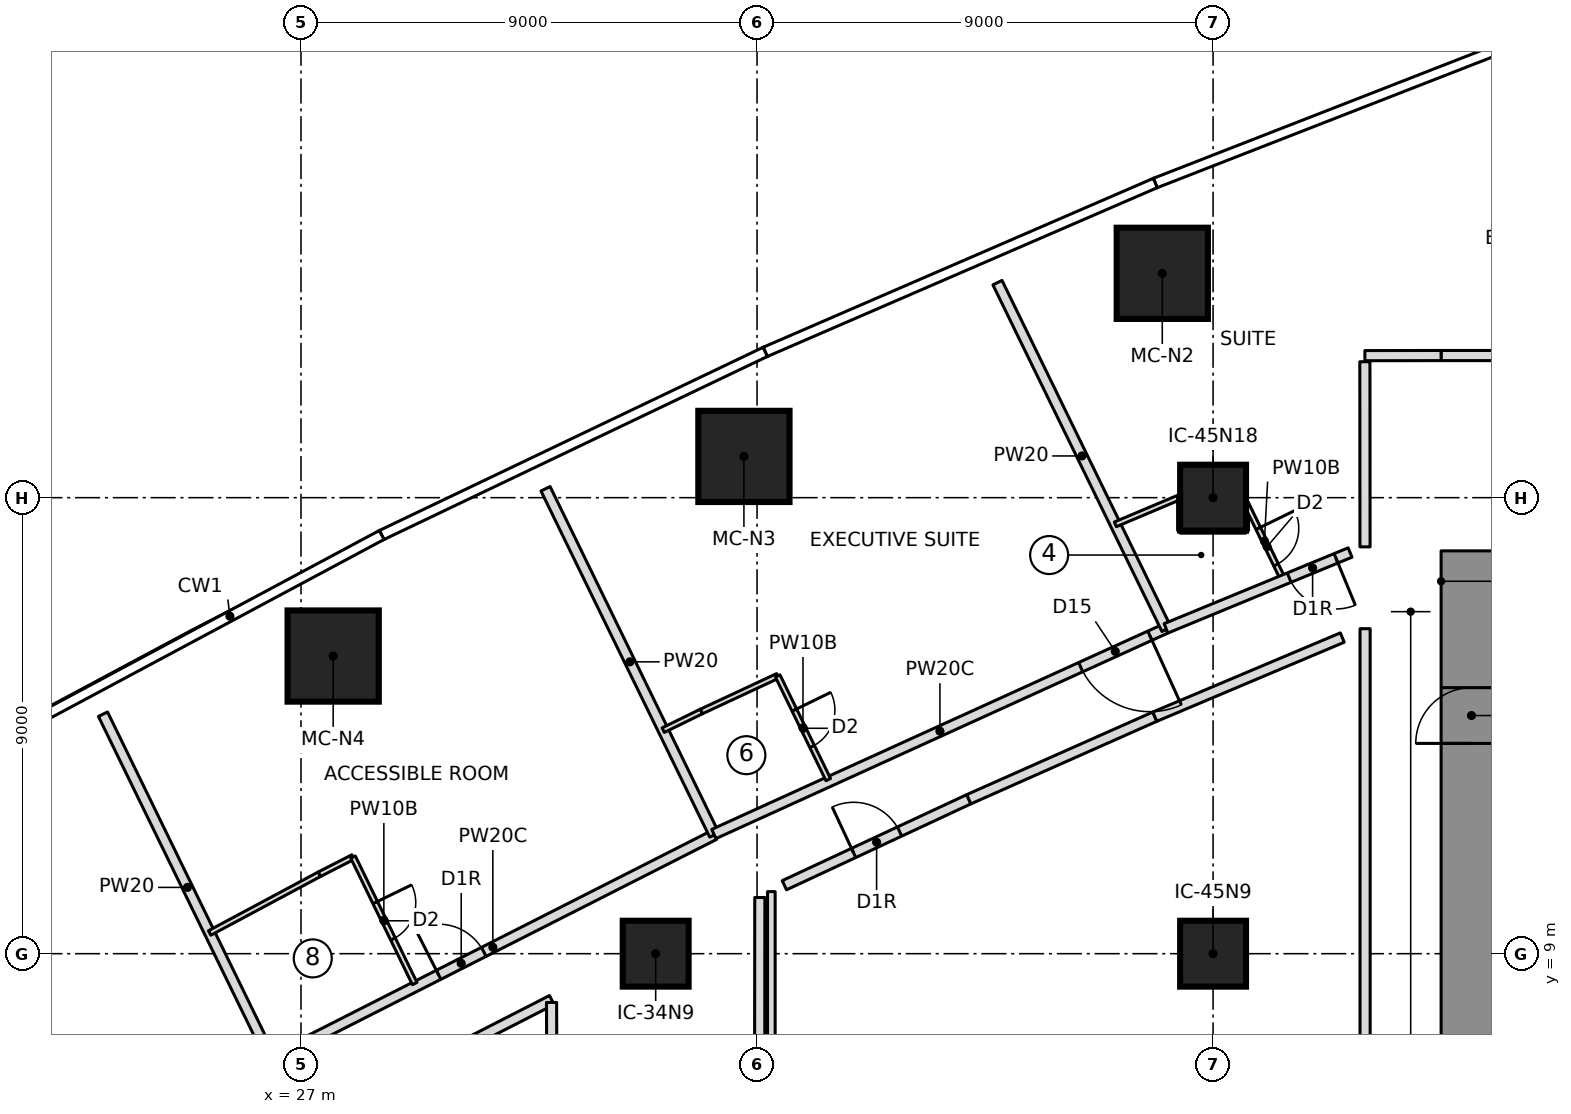
"""IFC4 building model, lengths in metres.
Left out: names, types, materials, properties, quantities, classifications, styles, units other than length and angle.
Written with IfcOpenShell. Run it as: python <this file> out.ifc"""

import sys

from ifc_helpers import new_model, si_unit, direction, frame, frame_2d, origin, origin_2d, place, context, subcontext, project, spatial, rectangle, extrude, element, fill, save


model = new_model("IFC4")
c1 = context("Model", 3, precision=1e-05, world=origin(), true_north=direction((0.0, 1.0)))
c2 = subcontext(c1, "Body", "Model", "MODEL_VIEW")
j1 = project(units=[si_unit("LENGTHUNIT", "METRE"), si_unit("PLANEANGLEUNIT", "RADIAN")], contexts=[c1])
p1 = place(None, origin())
s1 = spatial("IfcSite", under=j1, at=p1, CompositionType="ELEMENT")
p2 = place(p1, origin())
s2 = spatial("IfcBuilding", under=s1, at=p2, CompositionType="ELEMENT")
p3 = place(p2, frame((0.0, 0.0, 60.9)))
s3 = spatial("IfcBuildingStorey", under=s2, at=p3, CompositionType="ELEMENT", Elevation=60.9)
p4 = place(p3, frame((50.1, 6.65, 0.0), z_axis=(0.0, 0.0, 1.0), x_axis=(0.0, 1.0, 0.0)))
e1 = element("IfcWall", 1, at=p4, inside=s3, PredefinedType="SHEAR", context=c2, shape_type="SweptSolid", body=[
    extrude(rectangle(XDim=10.3, YDim=1.2, at=frame_2d((5.15, 0.0))), origin(), (0.0, 0.0, 1.0), 3.55),
])
p5 = place(p4, frame((6.5, 0.0, 0.0)))
e2 = element("IfcOpeningElement", 2, at=p5, cuts=e1, PredefinedType="OPENING", context=c2, shape_type="SweptSolid", body=[
    extrude(rectangle(XDim=1.1, YDim=2.1, at=frame_2d((0.55, 1.05))), frame((0.0, 0.61, 0.0), z_axis=(0.0, -1.0, 0.0), x_axis=(1.0, 0.0, 0.0)), (0.0, 0.0, 1.0), 1.22),
])
for number, where, z_axis, x_axis in (
    (3, (43.998, 22.428, 0.0), (0.0, 0.0, 1.0), (1.0, 0.0, 0.0)),
    (4, (35.741, 18.814, 0.0), (0.0, 0.0, 1.0), (1.0, 0.0, 0.0)),
    (5, (27.635, 14.874, 0.0), (0.0, 0.0, 1.0), (1.0, 0.0, 0.0)),
):
    element("IfcColumn", number, at=place(p3, frame(where, z_axis=z_axis, x_axis=x_axis)), inside=s3, PredefinedType="COLUMN", context=c2, shape_type="SweptSolid", body=[
        extrude(rectangle(XDim=1.8, YDim=1.8, at=origin_2d()), origin(), (0.0, 0.0, 1.0), 3.55),
    ])
for number, where, z_axis, x_axis in (
    (6, (34.0, 9.0, 0.0), (0.0, 0.0, 1.0), (1.0, 0.0, 0.0)),
    (7, (45.0, 9.0, 0.0), (0.0, 0.0, 1.0), (1.0, 0.0, 0.0)),
    (8, (45.0, 18.0, 0.0), (0.0, 0.0, 1.0), (1.0, 0.0, 0.0)),
):
    element("IfcColumn", number, at=place(p3, frame(where, z_axis=z_axis, x_axis=x_axis)), inside=s3, PredefinedType="COLUMN", context=c2, shape_type="SweptSolid", body=[
        extrude(rectangle(XDim=1.3, YDim=1.3, at=origin_2d()), origin(), (0.0, 0.0, 1.0), 3.55),
    ])
p6 = place(p3, frame((26.425, 6.89, 0.0), z_axis=(0.0, 0.0, 1.0), x_axis=(-0.438202895602, 0.898876088394, 0.0)))
e9 = element("IfcWall", 9, at=p6, inside=s3, PredefinedType="PARTITIONING", context=c2, shape_type="SweptSolid", body=[
    extrude(rectangle(XDim=7.605, YDim=0.2, at=frame_2d((3.803, 0.0))), origin(), (0.0, 0.0, 1.0), 3.25),
])
p7 = place(p3, frame((26.417, 6.908, 0.0), z_axis=(0.0, 0.0, 1.0), x_axis=(0.891700643128, 0.452625632334, 0.0)))
e10 = element("IfcWall", 10, at=p7, inside=s3, PredefinedType="PARTITIONING", context=c2, shape_type="SweptSolid", body=[
    extrude(rectangle(XDim=9.801, YDim=0.2, at=frame_2d((4.901, 0.0))), origin(), (0.0, 0.0, 1.0), 3.25),
])
p8 = place(p7, frame((3.7, 0.0, 0.0)))
e11 = element("IfcOpeningElement", 11, at=p8, cuts=e10, PredefinedType="OPENING", context=c2, shape_type="SweptSolid", body=[
    extrude(rectangle(XDim=1.0, YDim=2.1, at=frame_2d((0.5, 1.05))), frame((0.0, 0.11, 0.0), z_axis=(0.0, -1.0, 0.0), x_axis=(1.0, 0.0, 0.0)), (0.0, 0.0, 1.0), 0.22),
])
p9 = place(p3, frame((25.198, 9.409, 0.0), z_axis=(0.0, 0.0, 1.0), x_axis=(0.881658684569, 0.471887660279, 0.0)))
e12 = element("IfcWall", 12, at=p9, inside=s3, PredefinedType="PARTITIONING", context=c2, shape_type="SweptSolid", body=[
    extrude(rectangle(XDim=2.457, YDim=0.1, at=frame_2d((1.228, 0.0))), origin(), (0.0, 0.0, 1.0), 3.25),
])
p10 = place(p3, frame((27.363, 10.568, 0.0), z_axis=(0.0, 0.0, 1.0), x_axis=(0.890195653003, 0.455578422858, 0.0)))
e13 = element("IfcWall", 13, at=p10, inside=s3, PredefinedType="PARTITIONING", context=c2, shape_type="SweptSolid", body=[
    extrude(rectangle(XDim=0.745, YDim=0.1, at=frame_2d((0.373, 0.0))), origin(), (0.0, 0.0, 1.0), 3.25),
])
p11 = place(p3, frame((28.027, 10.907, 0.0), z_axis=(0.0, 0.0, 1.0), x_axis=(0.438189818179, -0.898882463531, 0.0)))
e14 = element("IfcWall", 14, at=p11, inside=s3, PredefinedType="PARTITIONING", context=c2, shape_type="SweptSolid", body=[
    extrude(rectangle(XDim=2.777, YDim=0.1, at=frame_2d((1.389, 0.0))), origin(), (0.0, 0.0, 1.0), 3.25),
])
p12 = place(p11, frame((1.0, 0.0, 0.0)))
e15 = element("IfcOpeningElement", 15, at=p12, cuts=e14, PredefinedType="OPENING", context=c2, shape_type="SweptSolid", body=[
    extrude(rectangle(XDim=0.8, YDim=2.1, at=frame_2d((0.4, 1.05))), frame((0.0, 0.06, 0.0), z_axis=(0.0, -1.0, 0.0), x_axis=(1.0, 0.0, 0.0)), (0.0, 0.0, 1.0), 0.12),
])
p13 = place(p3, frame((35.156, 11.344, 0.0), z_axis=(0.0, 0.0, 1.0), x_axis=(-0.438196407286, 0.898879251425, 0.0)))
e16 = element("IfcWall", 16, at=p13, inside=s3, PredefinedType="PARTITIONING", context=c2, shape_type="SweptSolid", body=[
    extrude(rectangle(XDim=7.6, YDim=0.2, at=frame_2d((3.8, 0.0))), origin(), (0.0, 0.0, 1.0), 3.25),
])
p14 = place(p3, frame((44.072, 15.421, 0.0), z_axis=(0.0, 0.0, 1.0), x_axis=(-0.910287143541, -0.413977434534, 0.0)))
e17 = element("IfcWall", 17, at=p14, inside=s3, PredefinedType="PARTITIONING", context=c2, shape_type="SweptSolid", body=[
    extrude(rectangle(XDim=9.803, YDim=0.2, at=frame_2d((4.902, 0.0))), origin(), (0.0, 0.0, 1.0), 3.25),
])
p15 = place(p14, frame((0.35, 0.0, 0.0)))
e18 = element("IfcOpeningElement", 18, at=p15, cuts=e17, PredefinedType="OPENING", context=c2, shape_type="SweptSolid", body=[
    extrude(rectangle(XDim=1.5, YDim=2.1, at=frame_2d((0.75, 1.05))), frame((0.0, 0.11, 0.0), z_axis=(0.0, -1.0, 0.0), x_axis=(1.0, 0.0, 0.0)), (0.0, 0.0, 1.0), 0.22),
])
p16 = place(p3, frame((34.148, 13.412, 0.0), z_axis=(0.0, 0.0, 1.0), x_axis=(0.89828999443, 0.43940310184, 0.0)))
e19 = element("IfcWall", 19, at=p16, inside=s3, PredefinedType="PARTITIONING", context=c2, shape_type="SweptSolid", body=[
    extrude(rectangle(XDim=0.84, YDim=0.1, at=frame_2d((0.42, 0.0))), origin(), (0.0, 0.0, 1.0), 3.25),
])
p17 = place(p3, frame((34.903, 13.781, 0.0), z_axis=(0.0, 0.0, 1.0), x_axis=(0.906434605418, 0.422346192242, 0.0)))
e20 = element("IfcWall", 20, at=p17, inside=s3, PredefinedType="PARTITIONING", context=c2, shape_type="SweptSolid", body=[
    extrude(rectangle(XDim=1.661, YDim=0.1, at=frame_2d((0.83, 0.0))), origin(), (0.0, 0.0, 1.0), 3.25),
])
p18 = place(p3, frame((36.408, 14.482, 0.0), z_axis=(0.0, 0.0, 1.0), x_axis=(0.438271544149, -0.898842618921, 0.0)))
e21 = element("IfcWall", 21, at=p18, inside=s3, PredefinedType="PARTITIONING", context=c2, shape_type="SweptSolid", body=[
    extrude(rectangle(XDim=2.277, YDim=0.1, at=frame_2d((1.139, 0.0))), origin(), (0.0, 0.0, 1.0), 3.25),
])
p19 = place(p18, frame((0.75, 0.0, 0.0)))
e22 = element("IfcOpeningElement", 22, at=p19, cuts=e21, PredefinedType="OPENING", context=c2, shape_type="SweptSolid", body=[
    extrude(rectangle(XDim=0.8, YDim=2.1, at=frame_2d((0.4, 1.05))), frame((0.0, 0.06, 0.0), z_axis=(0.0, -1.0, 0.0), x_axis=(1.0, 0.0, 0.0)), (0.0, 0.0, 1.0), 0.12),
])
p20 = place(p3, frame((44.08, 15.403, 0.0), z_axis=(0.0, 0.0, 1.0), x_axis=(-0.438196739796, 0.898879089328, 0.0)))
e23 = element("IfcWall", 23, at=p20, inside=s3, PredefinedType="PARTITIONING", context=c2, shape_type="SweptSolid", body=[
    extrude(rectangle(XDim=7.611, YDim=0.2, at=frame_2d((3.806, 0.0))), origin(), (0.0, 0.0, 1.0), 3.25),
])
p21 = place(p3, frame((43.071, 17.473, 0.0), z_axis=(0.0, 0.0, 1.0), x_axis=(0.921313965742, 0.388819465214, 0.0)))
e24 = element("IfcWall", 24, at=p21, inside=s3, PredefinedType="PARTITIONING", context=c2, shape_type="SweptSolid", body=[
    extrude(rectangle(XDim=1.388, YDim=0.1, at=frame_2d((0.694, 0.0))), origin(), (0.0, 0.0, 1.0), 3.25),
])
p22 = place(p3, frame((44.35, 18.013, 0.0), z_axis=(0.0, 0.0, 1.0), x_axis=(0.0, -1.0, 0.0)))
e25 = element("IfcWall", 25, at=p22, inside=s3, PredefinedType="PARTITIONING", context=c2, shape_type="SweptSolid", body=[
    extrude(rectangle(XDim=0.661, YDim=0.1, at=frame_2d((0.331, 0.0))), origin(), (0.0, 0.0, 1.0), 3.25),
])
p23 = place(p3, frame((44.352, 17.35, 0.0), z_axis=(0.0, 0.0, 1.0), x_axis=(1.0, 0.0, 0.0)))
e26 = element("IfcWall", 26, at=p23, inside=s3, PredefinedType="PARTITIONING", context=c2, shape_type="SweptSolid", body=[
    extrude(rectangle(XDim=1.296, YDim=0.1, at=frame_2d((0.648, 0.0))), origin(), (0.0, 0.0, 1.0), 3.25),
])
p24 = place(p3, frame((45.65, 17.352, 0.0), z_axis=(0.0, 0.0, 1.0), x_axis=(0.0, 1.0, 0.0)))
e27 = element("IfcWall", 27, at=p24, inside=s3, PredefinedType="PARTITIONING", context=c2, shape_type="SweptSolid", body=[
    extrude(rectangle(XDim=0.536, YDim=0.1, at=frame_2d((0.268, 0.0))), origin(), (0.0, 0.0, 1.0), 3.25),
])
p25 = place(p3, frame((45.65, 17.888, 0.0), z_axis=(0.0, 0.0, 1.0), x_axis=(0.438301838547, -0.89882784688, 0.0)))
e28 = element("IfcWall", 28, at=p25, inside=s3, PredefinedType="PARTITIONING", context=c2, shape_type="SweptSolid", body=[
    extrude(rectangle(XDim=1.659, YDim=0.1, at=frame_2d((0.829, 0.0))), origin(), (0.0, 0.0, 1.0), 3.25),
])
p26 = place(p25, frame((0.55, 0.0, 0.0)))
e29 = element("IfcOpeningElement", 29, at=p26, cuts=e28, PredefinedType="OPENING", context=c2, shape_type="SweptSolid", body=[
    extrude(rectangle(XDim=0.8, YDim=2.1, at=frame_2d((0.4, 1.05))), frame((0.0, 0.06, 0.0), z_axis=(0.0, -1.0, 0.0), x_axis=(1.0, 0.0, 0.0)), (0.0, 0.0, 1.0), 0.12),
])
p27 = place(p3, frame((29.357, 6.758, 0.0), z_axis=(0.0, 0.0, 1.0), x_axis=(0.890213377055, 0.455543788579, 0.0)))
e30 = element("IfcWall", 30, at=p27, inside=s3, PredefinedType="PARTITIONING", context=c2, shape_type="SweptSolid", body=[
    extrude(rectangle(XDim=2.912, YDim=0.2, at=frame_2d((1.456, 0.0))), origin(), (0.0, 0.0, 1.0), 3.25),
])
p28 = place(p3, frame((36.283, -10.225, 0.0), z_axis=(0.0, 0.0, 1.0), x_axis=(0.0, 1.0, 0.0)))
e31 = element("IfcWall", 31, at=p28, inside=s3, PredefinedType="PARTITIONING", context=c2, shape_type="SweptSolid", body=[
    extrude(rectangle(XDim=20.45, YDim=0.15, at=frame_2d((10.225, 0.0))), origin(), (0.0, 0.0, 1.0), 3.25),
])
p29 = place(p3, frame((36.54, 10.351, 0.0), z_axis=(0.0, 0.0, 1.0), x_axis=(0.906347708834, 0.42253263861, 0.0)))
e32 = element("IfcWall", 32, at=p29, inside=s3, PredefinedType="PARTITIONING", context=c2, shape_type="SweptSolid", body=[
    extrude(rectangle(XDim=4.016, YDim=0.2, at=frame_2d((2.008, 0.0))), origin(), (0.0, 0.0, 1.0), 3.25),
])
p30 = place(p29, frame((1.508, 0.0, 0.0)))
e33 = element("IfcOpeningElement", 33, at=p30, cuts=e32, PredefinedType="OPENING", context=c2, shape_type="SweptSolid", body=[
    extrude(rectangle(XDim=1.0, YDim=2.1, at=frame_2d((0.5, 1.05))), frame((0.0, 0.11, 0.0), z_axis=(0.0, -1.0, 0.0), x_axis=(1.0, 0.0, 0.0)), (0.0, 0.0, 1.0), 0.22),
])
p31 = place(p3, frame((40.18, 12.048, 0.0), z_axis=(0.0, 0.0, 1.0), x_axis=(0.913986953061, 0.405743576209, 0.0)))
e34 = element("IfcWall", 34, at=p31, inside=s3, PredefinedType="PARTITIONING", context=c2, shape_type="SweptSolid", body=[
    extrude(rectangle(XDim=4.016, YDim=0.2, at=frame_2d((2.008, 0.0))), origin(), (0.0, 0.0, 1.0), 3.25),
])
p32 = place(p3, frame((43.85, 13.677, 0.0), z_axis=(0.0, 0.0, 1.0), x_axis=(0.921269894054, 0.388923877269, 0.0)))
e35 = element("IfcWall", 35, at=p32, inside=s3, PredefinedType="PARTITIONING", context=c2, shape_type="SweptSolid", body=[
    extrude(rectangle(XDim=4.016, YDim=0.2, at=frame_2d((2.008, 0.0))), origin(), (0.0, 0.0, 1.0), 3.25),
])
p33 = place(p3, frame((54.597, 20.805, 0.0), z_axis=(0.0, 0.0, 1.0), x_axis=(-1.0, 0.0, 0.0)))
e36 = element("IfcWall", 36, at=p33, inside=s3, PredefinedType="PARTITIONING", context=c2, shape_type="SweptSolid", body=[
    extrude(rectangle(XDim=5.097, YDim=0.2, at=frame_2d((2.548, 0.0))), origin(), (0.0, 0.0, 1.0), 3.25),
])
p34 = place(p33, frame((2.048, 0.0, 0.0)))
e37 = element("IfcOpeningElement", 37, at=p34, cuts=e36, PredefinedType="OPENING", context=c2, shape_type="SweptSolid", body=[
    extrude(rectangle(XDim=1.5, YDim=2.1, at=frame_2d((0.75, 1.05))), frame((0.0, 0.11, 0.0), z_axis=(0.0, -1.0, 0.0), x_axis=(1.0, 0.0, 0.0)), (0.0, 0.0, 1.0), 0.22),
])
p35 = place(p3, frame((47.704, 16.917, 0.0), z_axis=(0.0, 0.0, 1.0), x_axis=(-0.924573816857, -0.381002962169, 0.0)))
e38 = element("IfcWall", 38, at=p35, inside=s3, PredefinedType="PARTITIONING", context=c2, shape_type="SweptSolid", body=[
    extrude(rectangle(XDim=3.929, YDim=0.2, at=frame_2d((1.964, 0.0))), origin(), (0.0, 0.0, 1.0), 3.25),
])
p36 = place(p35, frame((0.3, 0.0, 0.0)))
e39 = element("IfcOpeningElement", 39, at=p36, cuts=e38, PredefinedType="OPENING", context=c2, shape_type="SweptSolid", body=[
    extrude(rectangle(XDim=1.0, YDim=2.1, at=frame_2d((0.5, 1.05))), frame((0.0, 0.11, 0.0), z_axis=(0.0, -1.0, 0.0), x_axis=(1.0, 0.0, 0.0)), (0.0, 0.0, 1.0), 0.22),
])
p37 = place(p3, frame((31.945, 8.037, 0.0), z_axis=(0.0, 0.0, 1.0), x_axis=(0.003129875123, -0.999995101929, 0.0)))
e40 = element("IfcWall", 40, at=p37, inside=s3, PredefinedType="PARTITIONING", context=c2, shape_type="SweptSolid", body=[
    extrude(rectangle(XDim=1.092, YDim=0.2, at=frame_2d((0.546, 0.0))), origin(), (0.0, 0.0, 1.0), 3.25),
])
p38 = place(p3, frame((36.052, 6.986, 0.0), z_axis=(0.0, 0.0, 1.0), x_axis=(0.000781799464, 0.999999694395, 0.0)))
e41 = element("IfcWall", 41, at=p38, inside=s3, PredefinedType="PARTITIONING", context=c2, shape_type="SweptSolid", body=[
    extrude(rectangle(XDim=3.123, YDim=0.2, at=frame_2d((1.562, 0.0))), origin(), (0.0, 0.0, 1.0), 3.25),
])
p39 = place(p3, frame((48.0, 15.414, 0.0), z_axis=(0.0, 0.0, 1.0), x_axis=(0.0, -1.0, 0.0)))
e42 = element("IfcWall", 42, at=p39, inside=s3, PredefinedType="PARTITIONING", context=c2, shape_type="SweptSolid", body=[
    extrude(rectangle(XDim=30.828, YDim=0.2, at=frame_2d((15.414, 0.0))), origin(), (0.0, 0.0, 1.0), 3.25),
])
p40 = place(p3, frame((49.5, 20.805, 0.0), z_axis=(0.0, 0.0, 1.0), x_axis=(-0.999998933031, -0.001460800259, 0.0)))
e43 = element("IfcWall", 43, at=p40, inside=s3, PredefinedType="PARTITIONING", context=c2, shape_type="SweptSolid", body=[
    extrude(rectangle(XDim=1.504, YDim=0.2, at=frame_2d((0.752, 0.0))), origin(), (0.0, 0.0, 1.0), 3.25),
])
p41 = place(p3, frame((47.996, 20.683, 0.0), z_axis=(0.0, 0.0, 1.0), x_axis=(0.000801763623, -0.999999678587, 0.0)))
e44 = element("IfcWall", 44, at=p41, inside=s3, PredefinedType="PARTITIONING", context=c2, shape_type="SweptSolid", body=[
    extrude(rectangle(XDim=3.654, YDim=0.2, at=frame_2d((1.827, 0.0))), origin(), (0.0, 0.0, 1.0), 3.25),
])
p42 = place(p12, origin())
e45 = element("IfcDoor", 45, at=p42, inside=s3, OperationType="SINGLE_SWING_LEFT", PredefinedType="DOOR", context=c2, shape_type="SweptSolid", body=[
    extrude(rectangle(XDim=0.8, YDim=2.1, at=frame_2d((0.4, 1.05))), frame((0.0, 0.025, 0.0), z_axis=(0.0, -1.0, 0.0), x_axis=(1.0, 0.0, 0.0)), (0.0, 0.0, 1.0), 0.05),
])
fill(e15, e45)
p43 = place(p8, origin())
e46 = element("IfcDoor", 46, at=p43, inside=s3, OperationType="SINGLE_SWING_RIGHT", PredefinedType="DOOR", context=c2, shape_type="SweptSolid", body=[
    extrude(rectangle(XDim=1.0, YDim=2.1, at=frame_2d((0.5, 1.05))), frame((0.0, 0.025, 0.0), z_axis=(0.0, -1.0, 0.0), x_axis=(1.0, 0.0, 0.0)), (0.0, 0.0, 1.0), 0.05),
])
fill(e11, e46)
p44 = place(p19, origin())
e47 = element("IfcDoor", 47, at=p44, inside=s3, OperationType="SINGLE_SWING_LEFT", PredefinedType="DOOR", context=c2, shape_type="SweptSolid", body=[
    extrude(rectangle(XDim=0.8, YDim=2.1, at=frame_2d((0.4, 1.05))), frame((0.0, 0.025, 0.0), z_axis=(0.0, -1.0, 0.0), x_axis=(1.0, 0.0, 0.0)), (0.0, 0.0, 1.0), 0.05),
])
fill(e22, e47)
p45 = place(p15, origin())
e48 = element("IfcDoor", 48, at=p45, inside=s3, OperationType="DOUBLE_DOOR_SINGLE_SWING", PredefinedType="DOOR", context=c2, shape_type="SweptSolid", body=[
    extrude(rectangle(XDim=1.5, YDim=2.1, at=frame_2d((0.75, 1.05))), frame((0.0, 0.025, 0.0), z_axis=(0.0, -1.0, 0.0), x_axis=(1.0, 0.0, 0.0)), (0.0, 0.0, 1.0), 0.05),
])
fill(e18, e48)
p46 = place(p26, origin())
e49 = element("IfcDoor", 49, at=p46, inside=s3, OperationType="SINGLE_SWING_LEFT", PredefinedType="DOOR", context=c2, shape_type="SweptSolid", body=[
    extrude(rectangle(XDim=0.8, YDim=2.1, at=frame_2d((0.4, 1.05))), frame((0.0, 0.025, 0.0), z_axis=(0.0, -1.0, 0.0), x_axis=(1.0, 0.0, 0.0)), (0.0, 0.0, 1.0), 0.05),
])
fill(e29, e49)
p47 = place(p36, origin())
e50 = element("IfcDoor", 50, at=p47, inside=s3, OperationType="SINGLE_SWING_RIGHT", PredefinedType="DOOR", context=c2, shape_type="SweptSolid", body=[
    extrude(rectangle(XDim=1.0, YDim=2.1, at=frame_2d((0.5, 1.05))), frame((0.0, 0.025, 0.0), z_axis=(0.0, -1.0, 0.0), x_axis=(1.0, 0.0, 0.0)), (0.0, 0.0, 1.0), 0.05),
])
fill(e39, e50)
p48 = place(p30, origin())
e51 = element("IfcDoor", 51, at=p48, inside=s3, OperationType="SINGLE_SWING_RIGHT", PredefinedType="DOOR", context=c2, shape_type="SweptSolid", body=[
    extrude(rectangle(XDim=1.0, YDim=2.1, at=frame_2d((0.5, 1.05))), frame((0.0, 0.025, 0.0), z_axis=(0.0, -1.0, 0.0), x_axis=(1.0, 0.0, 0.0)), (0.0, 0.0, 1.0), 0.05),
])
fill(e33, e51)
p49 = place(p5, origin())
e52 = element("IfcDoor", 52, at=p49, inside=s3, OperationType="SINGLE_SWING_RIGHT", PredefinedType="DOOR", context=c2, shape_type="SweptSolid", body=[
    extrude(rectangle(XDim=1.1, YDim=2.1, at=frame_2d((0.55, 1.05))), frame((0.0, 0.025, 0.0), z_axis=(0.0, -1.0, 0.0), x_axis=(1.0, 0.0, 0.0)), (0.0, 0.0, 1.0), 0.05),
])
fill(e2, e52)
save(model, sys.argv[1])
